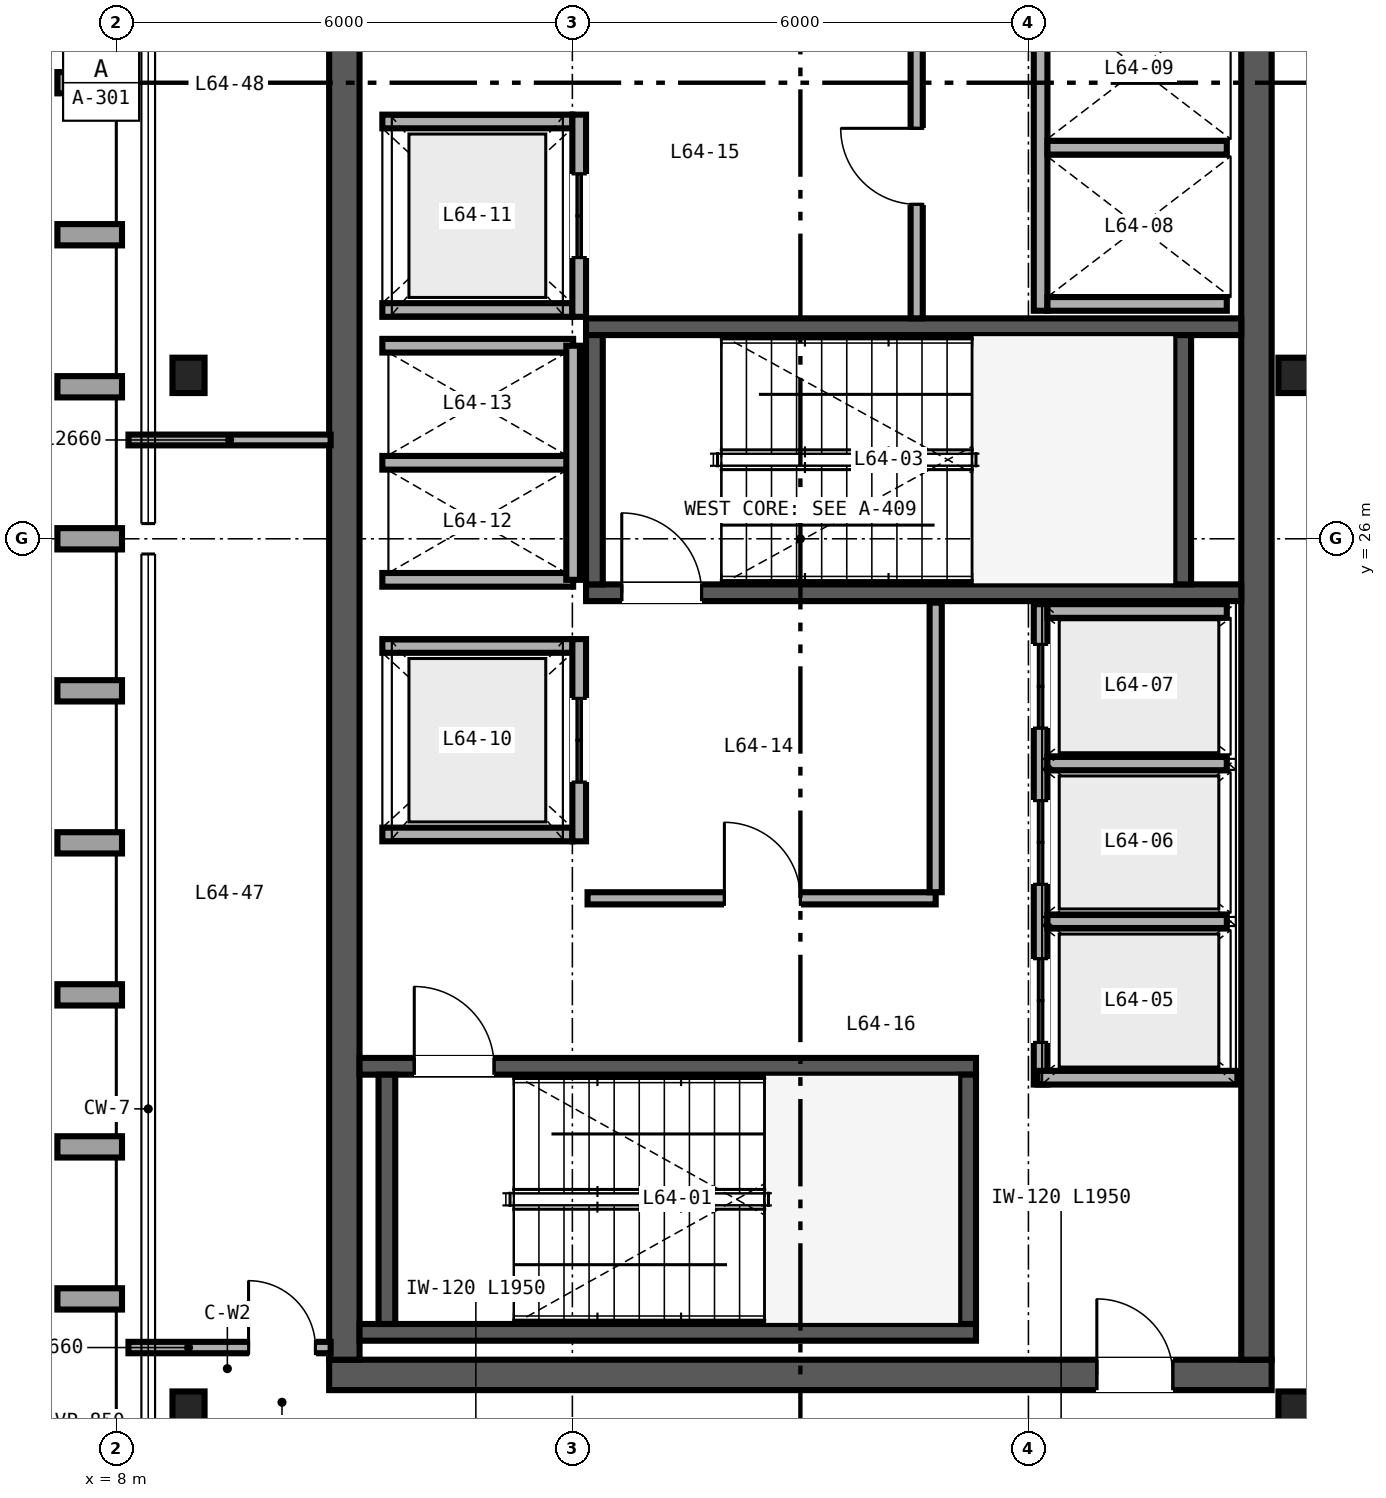
"""IFC4 building model, lengths in metres.
Left out: names, types, materials, properties, quantities, classifications, styles, units other than length and angle.
Written with IfcOpenShell. Run it as: python <this file> out.ifc"""

import sys

from ifc_helpers import new_model, si_unit, direction, frame, frame_2d, origin, origin_2d, place, context, subcontext, project, spatial, rectangle, i_section, extrude, source, transform, mapped, element, fill, save


model = new_model("IFC4")
c1 = context("Model", 3, precision=1e-05, world=origin(), true_north=direction((0.0, 1.0)))
c2 = subcontext(c1, "Body", "Model", "MODEL_VIEW")
j1 = project(units=[si_unit("LENGTHUNIT", "METRE"), si_unit("PLANEANGLEUNIT", "RADIAN")], contexts=[c1])
p1 = place(None, origin())
s1 = spatial("IfcSite", under=j1, at=p1, CompositionType="ELEMENT")
p2 = place(p1, origin())
s2 = spatial("IfcBuilding", under=s1, at=p2, CompositionType="ELEMENT")
p3 = place(p2, frame((0.0, 0.0, 254.4)))
s3 = spatial("IfcBuildingStorey", under=s2, at=p3, CompositionType="ELEMENT", Elevation=254.4)
p4 = place(p3, frame((10.8, 15.0, 0.0), z_axis=(0.0, 0.0, 1.0), x_axis=(1.0, 0.0, 0.0)))
e1 = element("IfcWall", 1, at=p4, inside=s3, PredefinedType="SHEAR", context=c2, shape_type="SweptSolid", body=[
    extrude(rectangle(XDim=12.4, YDim=0.4, at=frame_2d((6.2, 0.0))), origin(), (0.0, 0.0, 1.0), 3.38),
])
p5 = place(p4, frame((10.1, 0.0, 0.0)))
e2 = element("IfcOpeningElement", 2, at=p5, cuts=e1, PredefinedType="OPENING", context=c2, shape_type="SweptSolid", body=[
    extrude(rectangle(XDim=1.0, YDim=2.15, at=frame_2d((0.5, 1.075))), frame((0.0, 0.21, 0.0), z_axis=(0.0, -1.0, 0.0), x_axis=(1.0, 0.0, 0.0)), (0.0, 0.0, 1.0), 0.42),
])
for number, where, z_axis, x_axis in (
    (3, (11.0, 15.2, 0.0), (0.0, 0.0, 1.0), (0.0, 1.0, 0.0)),
    (4, (23.0, 15.2, 0.0), (0.0, 0.0, 1.0), (0.0, 1.0, 0.0)),
):
    element("IfcWall", number, at=place(p3, frame(where, z_axis=z_axis, x_axis=x_axis)), inside=s3, PredefinedType="SHEAR", context=c2, shape_type="SweptSolid", body=[
        extrude(rectangle(XDim=21.6, YDim=0.4, at=frame_2d((10.8, 0.0))), origin(), (0.0, 0.0, 1.0), 3.38),
    ])
p6 = place(p3, frame((11.2, 15.56, 0.0), z_axis=(0.0, 0.0, 1.0), x_axis=(1.0, 0.0, 0.0)))
e5 = element("IfcWall", 5, at=p6, inside=s3, PredefinedType="SHEAR", context=c2, shape_type="SweptSolid", body=[
    extrude(rectangle(XDim=8.11, YDim=0.22, at=frame_2d((4.055, 0.0))), origin(), (0.0, 0.0, 1.0), 3.4),
])
p7 = place(p3, frame((11.2, 19.06, 0.0), z_axis=(0.0, 0.0, 1.0), x_axis=(1.0, 0.0, 0.0)))
e6 = element("IfcWall", 6, at=p7, inside=s3, PredefinedType="SHEAR", context=c2, shape_type="SweptSolid", body=[
    extrude(rectangle(XDim=8.11, YDim=0.22, at=frame_2d((4.055, 0.0))), origin(), (0.0, 0.0, 1.0), 3.4),
])
p8 = place(p7, frame((0.72, 0.0, 0.0)))
e7 = element("IfcOpeningElement", 7, at=p8, cuts=e6, PredefinedType="OPENING", context=c2, shape_type="SweptSolid", body=[
    extrude(rectangle(XDim=1.05, YDim=2.15, at=frame_2d((0.525, 1.075))), frame((0.0, 0.12, 0.0), z_axis=(0.0, -1.0, 0.0), x_axis=(1.0, 0.0, 0.0)), (0.0, 0.0, 1.0), 0.24),
])
for number, where, z_axis, x_axis in (
    (8, (11.56, 15.67, 0.0), (0.0, 0.0, 1.0), (0.0, 1.0, 0.0)),
    (9, (19.2, 15.67, 0.0), (0.0, 0.0, 1.0), (0.0, 1.0, 0.0)),
):
    element("IfcWall", number, at=place(p3, frame(where, z_axis=z_axis, x_axis=x_axis)), inside=s3, PredefinedType="SHEAR", context=c2, shape_type="SweptSolid", body=[
        extrude(rectangle(XDim=3.28, YDim=0.22, at=frame_2d((1.64, 0.0))), origin(), (0.0, 0.0, 1.0), 3.4),
    ])
p9 = place(p3, frame((14.18, 25.29, 0.0), z_axis=(0.0, 0.0, 1.0), x_axis=(1.0, 0.0, 0.0)))
e10 = element("IfcWall", 10, at=p9, inside=s3, PredefinedType="SHEAR", context=c2, shape_type="SweptSolid", body=[
    extrude(rectangle(XDim=8.62, YDim=0.22, at=frame_2d((4.31, 0.0))), origin(), (0.0, 0.0, 1.0), 3.4),
])
p10 = place(p9, frame((0.47, 0.0, 0.0)))
e11 = element("IfcOpeningElement", 11, at=p10, cuts=e10, PredefinedType="OPENING", context=c2, shape_type="SweptSolid", body=[
    extrude(rectangle(XDim=1.05, YDim=2.15, at=frame_2d((0.525, 1.075))), frame((0.0, 0.12, 0.0), z_axis=(0.0, -1.0, 0.0), x_axis=(1.0, 0.0, 0.0)), (0.0, 0.0, 1.0), 0.24),
])
p11 = place(p3, frame((14.18, 28.79, 0.0), z_axis=(0.0, 0.0, 1.0), x_axis=(1.0, 0.0, 0.0)))
e12 = element("IfcWall", 12, at=p11, inside=s3, PredefinedType="SHEAR", context=c2, shape_type="SweptSolid", body=[
    extrude(rectangle(XDim=8.62, YDim=0.22, at=frame_2d((4.31, 0.0))), origin(), (0.0, 0.0, 1.0), 3.4),
])
for number, where, z_axis, x_axis in (
    (13, (14.29, 25.4, 0.0), (0.0, 0.0, 1.0), (0.0, 1.0, 0.0)),
    (14, (22.03, 25.4, 0.0), (0.0, 0.0, 1.0), (0.0, 1.0, 0.0)),
):
    element("IfcWall", number, at=place(p3, frame(where, z_axis=z_axis, x_axis=x_axis)), inside=s3, PredefinedType="SHEAR", context=c2, shape_type="SweptSolid", body=[
        extrude(rectangle(XDim=3.28, YDim=0.22, at=frame_2d((1.64, 0.0))), origin(), (0.0, 0.0, 1.0), 3.4),
    ])
m1 = source(origin(), c2, "Body", "SweptSolid", [
    extrude(i_section(OverallWidth=0.422, OverallDepth=0.465, WebThickness=0.045, FlangeThickness=0.073, FilletRadius=0.025, at=origin_2d()), origin(), (0.0, 0.0, 1.0), 3.38),
])
for number, where, z_axis, x_axis in (
    (15, (8.95, 14.55, 0.0), (0.0, 0.0, 1.0), (1.0, 0.0, 0.0)),
    (16, (23.5, 14.55, 0.0), (0.0, 0.0, 1.0), (1.0, 0.0, 0.0)),
    (17, (8.95, 28.15, 0.0), (0.0, 0.0, 1.0), (1.0, 0.0, 0.0)),
    (18, (23.5, 28.15, 0.0), (0.0, 0.0, 1.0), (1.0, 0.0, 0.0)),
):
    element("IfcColumn", number, at=place(p3, frame(where, z_axis=z_axis, x_axis=x_axis)), inside=s3, PredefinedType="COLUMN", context=c2, shape_type="MappedRepresentation", body=[
        mapped(m1, transform((0.0, 0.0, 0.0), scale=1.0)),
    ])
p12 = place(p3, frame((20.16, 18.82, 0.0), z_axis=(0.0, 0.0, 1.0), x_axis=(0.0, 1.0, 0.0)))
e19 = element("IfcWall", 19, at=p12, inside=s3, PredefinedType="SOLIDWALL", context=c2, shape_type="SweptSolid", body=[
    extrude(rectangle(XDim=6.32, YDim=0.18, at=frame_2d((3.16, 0.0))), origin(), (0.0, 0.0, 1.0), 2.48),
])
p13 = place(p12, frame((0.555, 0.0, 0.0)))
e20 = element("IfcOpeningElement", 20, at=p13, cuts=e19, PredefinedType="OPENING", context=c2, shape_type="SweptSolid", body=[
    extrude(rectangle(XDim=1.1, YDim=2.2, at=frame_2d((0.55, 1.1))), frame((0.0, 0.1, 0.0), z_axis=(0.0, -1.0, 0.0), x_axis=(1.0, 0.0, 0.0)), (0.0, 0.0, 1.0), 0.2),
])
p14 = place(p12, frame((2.635, 0.0, 0.0)))
e21 = element("IfcOpeningElement", 21, at=p14, cuts=e19, PredefinedType="OPENING", context=c2, shape_type="SweptSolid", body=[
    extrude(rectangle(XDim=1.1, YDim=2.2, at=frame_2d((0.55, 1.1))), frame((0.0, 0.1, 0.0), z_axis=(0.0, -1.0, 0.0), x_axis=(1.0, 0.0, 0.0)), (0.0, 0.0, 1.0), 0.2),
])
p15 = place(p12, frame((4.69, 0.0, 0.0)))
e22 = element("IfcOpeningElement", 22, at=p15, cuts=e19, PredefinedType="OPENING", context=c2, shape_type="SweptSolid", body=[
    extrude(rectangle(XDim=1.1, YDim=2.2, at=frame_2d((0.55, 1.1))), frame((0.0, 0.1, 0.0), z_axis=(0.0, -1.0, 0.0), x_axis=(1.0, 0.0, 0.0)), (0.0, 0.0, 1.0), 0.2),
])
p16 = place(p3, frame((20.12, 18.91, 0.0), z_axis=(0.0, 0.0, 1.0), x_axis=(1.0, 0.0, 0.0)))
e23 = element("IfcWall", 23, at=p16, inside=s3, PredefinedType="SOLIDWALL", context=c2, shape_type="SweptSolid", body=[
    extrude(rectangle(XDim=2.63, YDim=0.18, at=frame_2d((1.315, 0.0))), origin(), (0.0, 0.0, 1.0), 3.38),
])
p17 = place(p3, frame((20.25, 25.05, 0.0), z_axis=(0.0, 0.0, 1.0), x_axis=(1.0, 0.0, 0.0)))
e24 = element("IfcWall", 24, at=p17, inside=s3, PredefinedType="SOLIDWALL", context=c2, shape_type="SweptSolid", body=[
    extrude(rectangle(XDim=2.36, YDim=0.18, at=frame_2d((1.18, 0.0))), origin(), (0.0, 0.0, 1.0), 3.38),
])
p18 = place(p3, frame((20.25, 20.965, 0.0), z_axis=(0.0, 0.0, 1.0), x_axis=(1.0, 0.0, 0.0)))
e25 = element("IfcWall", 25, at=p18, inside=s3, PredefinedType="SOLIDWALL", context=c2, shape_type="SweptSolid", body=[
    extrude(rectangle(XDim=2.36, YDim=0.18, at=frame_2d((1.18, 0.0))), origin(), (0.0, 0.0, 1.0), 2.48),
])
p19 = place(p3, frame((20.25, 23.045, 0.0), z_axis=(0.0, 0.0, 1.0), x_axis=(1.0, 0.0, 0.0)))
e26 = element("IfcWall", 26, at=p19, inside=s3, PredefinedType="SOLIDWALL", context=c2, shape_type="SweptSolid", body=[
    extrude(rectangle(XDim=2.36, YDim=0.18, at=frame_2d((1.18, 0.0))), origin(), (0.0, 0.0, 1.0), 3.38),
])
p20 = place(p3, frame((20.16, 29.0, 0.0), z_axis=(0.0, 0.0, 1.0), x_axis=(0.0, 1.0, 0.0)))
e27 = element("IfcWall", 27, at=p20, inside=s3, PredefinedType="SOLIDWALL", context=c2, shape_type="SweptSolid", body=[
    extrude(rectangle(XDim=4.29, YDim=0.18, at=frame_2d((2.145, 0.0))), origin(), (0.0, 0.0, 1.0), 3.38),
])
for number, where, z_axis, x_axis in (
    (28, (20.25, 29.09, 0.0), (0.0, 0.0, 1.0), (1.0, 0.0, 0.0)),
    (29, (20.25, 31.145, 0.0), (0.0, 0.0, 1.0), (1.0, 0.0, 0.0)),
):
    element("IfcWall", number, at=place(p3, frame(where, z_axis=z_axis, x_axis=x_axis)), inside=s3, PredefinedType="SOLIDWALL", context=c2, shape_type="SweptSolid", body=[
        extrude(rectangle(XDim=2.36, YDim=0.18, at=frame_2d((1.18, 0.0))), origin(), (0.0, 0.0, 1.0), 3.38),
    ])
for number, where, z_axis, x_axis in (
    (30, (11.5, 22.11, 0.0), (0.0, 0.0, 1.0), (1.0, 0.0, 0.0)),
    (31, (11.5, 24.59, 0.0), (0.0, 0.0, 1.0), (1.0, 0.0, 0.0)),
):
    element("IfcWall", number, at=place(p3, frame(where, z_axis=z_axis, x_axis=x_axis)), inside=s3, PredefinedType="SOLIDWALL", context=c2, shape_type="SweptSolid", body=[
        extrude(rectangle(XDim=2.5, YDim=0.18, at=frame_2d((1.25, 0.0))), origin(), (0.0, 0.0, 1.0), 3.38),
    ])
p21 = place(p3, frame((14.09, 22.02, 0.0), z_axis=(0.0, 0.0, 1.0), x_axis=(0.0, 1.0, 0.0)))
e32 = element("IfcWall", 32, at=p21, inside=s3, PredefinedType="SOLIDWALL", context=c2, shape_type="SweptSolid", body=[
    extrude(rectangle(XDim=2.66, YDim=0.18, at=frame_2d((1.33, 0.0))), origin(), (0.0, 0.0, 1.0), 3.38),
])
p22 = place(p21, frame((0.78, 0.0, 0.0)))
e33 = element("IfcOpeningElement", 33, at=p22, cuts=e32, PredefinedType="OPENING", context=c2, shape_type="SweptSolid", body=[
    extrude(rectangle(XDim=1.1, YDim=2.2, at=frame_2d((0.55, 1.1))), frame((0.0, 0.1, 0.0), z_axis=(0.0, -1.0, 0.0), x_axis=(1.0, 0.0, 0.0)), (0.0, 0.0, 1.0), 0.2),
])
for number, where, z_axis, x_axis in (
    (34, (11.5, 29.01, 0.0), (0.0, 0.0, 1.0), (1.0, 0.0, 0.0)),
    (35, (11.5, 31.49, 0.0), (0.0, 0.0, 1.0), (1.0, 0.0, 0.0)),
):
    element("IfcWall", number, at=place(p3, frame(where, z_axis=z_axis, x_axis=x_axis)), inside=s3, PredefinedType="SOLIDWALL", context=c2, shape_type="SweptSolid", body=[
        extrude(rectangle(XDim=2.5, YDim=0.18, at=frame_2d((1.25, 0.0))), origin(), (0.0, 0.0, 1.0), 3.38),
    ])
p23 = place(p3, frame((14.09, 28.92, 0.0), z_axis=(0.0, 0.0, 1.0), x_axis=(0.0, 1.0, 0.0)))
e36 = element("IfcWall", 36, at=p23, inside=s3, PredefinedType="SOLIDWALL", context=c2, shape_type="SweptSolid", body=[
    extrude(rectangle(XDim=2.66, YDim=0.18, at=frame_2d((1.33, 0.0))), origin(), (0.0, 0.0, 1.0), 3.38),
])
p24 = place(p23, frame((0.78, 0.0, 0.0)))
e37 = element("IfcOpeningElement", 37, at=p24, cuts=e36, PredefinedType="OPENING", context=c2, shape_type="SweptSolid", body=[
    extrude(rectangle(XDim=1.1, YDim=2.2, at=frame_2d((0.55, 1.1))), frame((0.0, 0.1, 0.0), z_axis=(0.0, -1.0, 0.0), x_axis=(1.0, 0.0, 0.0)), (0.0, 0.0, 1.0), 0.2),
])
for number, where, z_axis, x_axis in (
    (38, (11.5, 25.46, 0.0), (0.0, 0.0, 1.0), (1.0, 0.0, 0.0)),
    (39, (11.5, 27.0, 0.0), (0.0, 0.0, 1.0), (1.0, 0.0, 0.0)),
    (40, (11.5, 28.54, 0.0), (0.0, 0.0, 1.0), (1.0, 0.0, 0.0)),
):
    element("IfcWall", number, at=place(p3, frame(where, z_axis=z_axis, x_axis=x_axis)), inside=s3, PredefinedType="SOLIDWALL", context=c2, shape_type="SweptSolid", body=[
        extrude(rectangle(XDim=2.51, YDim=0.18, at=frame_2d((1.255, 0.0))), origin(), (0.0, 0.0, 1.0), 3.38),
    ])
p25 = place(p3, frame((14.01, 25.46, 0.0), z_axis=(0.0, 0.0, 1.0), x_axis=(0.0, 1.0, 0.0)))
e41 = element("IfcWall", 41, at=p25, inside=s3, PredefinedType="SOLIDWALL", context=c2, shape_type="SweptSolid", body=[
    extrude(rectangle(XDim=3.08, YDim=0.18, at=frame_2d((1.54, 0.0))), origin(), (0.0, 0.0, 1.0), 3.38),
])
p26 = place(p3, frame((14.2, 21.27, 0.0), z_axis=(0.0, 0.0, 1.0), x_axis=(1.0, 0.0, 0.0)))
e42 = element("IfcWall", 42, at=p26, inside=s3, PredefinedType="PARTITIONING", context=c2, shape_type="SweptSolid", body=[
    extrude(rectangle(XDim=4.58, YDim=0.16, at=frame_2d((2.29, 0.0))), origin(), (0.0, 0.0, 1.0), 3.38),
])
p27 = place(p26, frame((1.8, 0.0, 0.0)))
e43 = element("IfcOpeningElement", 43, at=p27, cuts=e42, PredefinedType="OPENING", context=c2, shape_type="SweptSolid", body=[
    extrude(rectangle(XDim=1.0, YDim=2.15, at=frame_2d((0.5, 1.075))), frame((0.0, 0.09, 0.0), z_axis=(0.0, -1.0, 0.0), x_axis=(1.0, 0.0, 0.0)), (0.0, 0.0, 1.0), 0.18),
])
p28 = place(p3, frame((18.78, 21.35, 0.0), z_axis=(0.0, 0.0, 1.0), x_axis=(0.0, 1.0, 0.0)))
e44 = element("IfcWall", 44, at=p28, inside=s3, PredefinedType="PARTITIONING", context=c2, shape_type="SweptSolid", body=[
    extrude(rectangle(XDim=3.81, YDim=0.16, at=frame_2d((1.905, 0.0))), origin(), (0.0, 0.0, 1.0), 3.38),
])
p29 = place(p3, frame((18.53, 28.9, 0.0), z_axis=(0.0, 0.0, 1.0), x_axis=(0.0, 1.0, 0.0)))
e45 = element("IfcWall", 45, at=p29, inside=s3, PredefinedType="PARTITIONING", context=c2, shape_type="SweptSolid", body=[
    extrude(rectangle(XDim=3.9, YDim=0.16, at=frame_2d((1.95, 0.0))), origin(), (0.0, 0.0, 1.0), 3.38),
])
p30 = place(p29, frame((1.5, 0.0, 0.0)))
e46 = element("IfcOpeningElement", 46, at=p30, cuts=e45, PredefinedType="OPENING", context=c2, shape_type="SweptSolid", body=[
    extrude(rectangle(XDim=1.0, YDim=2.15, at=frame_2d((0.5, 1.075))), frame((0.0, 0.09, 0.0), z_axis=(0.0, -1.0, 0.0), x_axis=(1.0, 0.0, 0.0)), (0.0, 0.0, 1.0), 0.18),
])
p31 = place(p3, frame((8.16, 15.36, 0.0), z_axis=(0.0, 0.0, 1.0), x_axis=(1.0, 0.0, 0.0)))
e47 = element("IfcWall", 47, at=p31, inside=s3, PredefinedType="PARTITIONING", context=c2, shape_type="SweptSolid", body=[
    extrude(rectangle(XDim=2.66, YDim=0.15, at=frame_2d((1.33, 0.0))), origin(), (0.0, 0.0, 1.0), 2.601),
])
p32 = place(p31, frame((1.58, 0.0, 0.0)))
e48 = element("IfcOpeningElement", 48, at=p32, cuts=e47, PredefinedType="OPENING", context=c2, shape_type="SweptSolid", body=[
    extrude(rectangle(XDim=0.88, YDim=2.15, at=frame_2d((0.44, 1.075))), frame((0.0, 0.085, 0.0), z_axis=(0.0, -1.0, 0.0), x_axis=(1.0, 0.0, 0.0)), (0.0, 0.0, 1.0), 0.17),
])
p33 = place(p3, frame((8.16, 27.3, 0.0), z_axis=(0.0, 0.0, 1.0), x_axis=(1.0, 0.0, 0.0)))
e49 = element("IfcWall", 49, at=p33, inside=s3, PredefinedType="PARTITIONING", context=c2, shape_type="SweptSolid", body=[
    extrude(rectangle(XDim=2.66, YDim=0.142, at=frame_2d((1.33, 0.0))), origin(), (0.0, 0.0, 1.0), 2.601),
])
m2 = source(origin(), c2, "Body", "SweptSolid", [
    extrude(rectangle(XDim=1.05, YDim=2.15, at=frame_2d((0.525, 1.075))), frame((0.0, 0.025, 0.0), z_axis=(0.0, -1.0, 0.0), x_axis=(1.0, 0.0, 0.0)), (0.0, 0.0, 1.0), 0.05),
])
p34 = place(p8, origin())
e50 = element("IfcDoor", 50, at=p34, inside=s3, OperationType="SINGLE_SWING_LEFT", PredefinedType="DOOR", context=c2, shape_type="MappedRepresentation", body=[
    mapped(m2, transform((0.0, 0.0, 0.0), scale=1.0)),
])
fill(e7, e50)
p35 = place(p10, origin())
e51 = element("IfcDoor", 51, at=p35, inside=s3, OperationType="SINGLE_SWING_LEFT", PredefinedType="DOOR", context=c2, shape_type="MappedRepresentation", body=[
    mapped(m2, transform((0.0, 0.0, 0.0), scale=1.0)),
])
fill(e11, e51)
m3 = source(origin(), c2, "Body", "SweptSolid", [
    extrude(rectangle(XDim=1.1, YDim=2.2, at=frame_2d((0.55, 1.1))), frame((0.0, 0.025, 0.0), z_axis=(0.0, -1.0, 0.0), x_axis=(1.0, 0.0, 0.0)), (0.0, 0.0, 1.0), 0.05),
])
p36 = place(p13, origin())
e52 = element("IfcDoor", 52, at=p36, inside=s3, OperationType="DOUBLE_DOOR_SLIDING", PredefinedType="DOOR", context=c2, shape_type="MappedRepresentation", body=[
    mapped(m3, transform((0.0, 0.0, 0.0), scale=1.0)),
])
fill(e20, e52)
p37 = place(p14, origin())
e53 = element("IfcDoor", 53, at=p37, inside=s3, OperationType="DOUBLE_DOOR_SLIDING", PredefinedType="DOOR", context=c2, shape_type="MappedRepresentation", body=[
    mapped(m3, transform((0.0, 0.0, 0.0), scale=1.0)),
])
fill(e21, e53)
p38 = place(p15, origin())
e54 = element("IfcDoor", 54, at=p38, inside=s3, OperationType="DOUBLE_DOOR_SLIDING", PredefinedType="DOOR", context=c2, shape_type="MappedRepresentation", body=[
    mapped(m3, transform((0.0, 0.0, 0.0), scale=1.0)),
])
fill(e22, e54)
p39 = place(p22, origin())
e55 = element("IfcDoor", 55, at=p39, inside=s3, OperationType="DOUBLE_DOOR_SLIDING", PredefinedType="DOOR", context=c2, shape_type="MappedRepresentation", body=[
    mapped(m3, transform((0.0, 0.0, 0.0), scale=1.0)),
])
fill(e33, e55)
p40 = place(p24, origin())
e56 = element("IfcDoor", 56, at=p40, inside=s3, OperationType="DOUBLE_DOOR_SLIDING", PredefinedType="DOOR", context=c2, shape_type="MappedRepresentation", body=[
    mapped(m3, transform((0.0, 0.0, 0.0), scale=1.0)),
])
fill(e37, e56)
m4 = source(origin(), c2, "Body", "SweptSolid", [
    extrude(rectangle(XDim=1.0, YDim=2.15, at=frame_2d((0.5, 1.075))), frame((0.0, 0.025, 0.0), z_axis=(0.0, -1.0, 0.0), x_axis=(1.0, 0.0, 0.0)), (0.0, 0.0, 1.0), 0.05),
])
p41 = place(p27, origin())
e57 = element("IfcDoor", 57, at=p41, inside=s3, OperationType="SINGLE_SWING_LEFT", PredefinedType="DOOR", context=c2, shape_type="MappedRepresentation", body=[
    mapped(m4, transform((0.0, 0.0, 0.0), scale=1.0)),
])
fill(e43, e57)
p42 = place(p30, origin())
e58 = element("IfcDoor", 58, at=p42, inside=s3, OperationType="SINGLE_SWING_RIGHT", PredefinedType="DOOR", context=c2, shape_type="MappedRepresentation", body=[
    mapped(m4, transform((0.0, 0.0, 0.0), scale=1.0)),
])
fill(e46, e58)
p43 = place(p5, origin())
e59 = element("IfcDoor", 59, at=p43, inside=s3, OperationType="SINGLE_SWING_LEFT", PredefinedType="DOOR", context=c2, shape_type="MappedRepresentation", body=[
    mapped(m4, transform((0.0, 0.0, 0.0), scale=1.0)),
])
fill(e2, e59)
m5 = source(origin(), c2, "Body", "SweptSolid", [
    extrude(rectangle(XDim=0.88, YDim=2.15, at=frame_2d((0.44, 1.075))), frame((0.0, 0.025, 0.0), z_axis=(0.0, -1.0, 0.0), x_axis=(1.0, 0.0, 0.0)), (0.0, 0.0, 1.0), 0.05),
])
p44 = place(p32, origin())
e60 = element("IfcDoor", 60, at=p44, inside=s3, OperationType="SINGLE_SWING_LEFT", PredefinedType="DOOR", context=c2, shape_type="MappedRepresentation", body=[
    mapped(m5, transform((0.0, 0.0, 0.0), scale=1.0)),
])
fill(e48, e60)
save(model, sys.argv[1])
